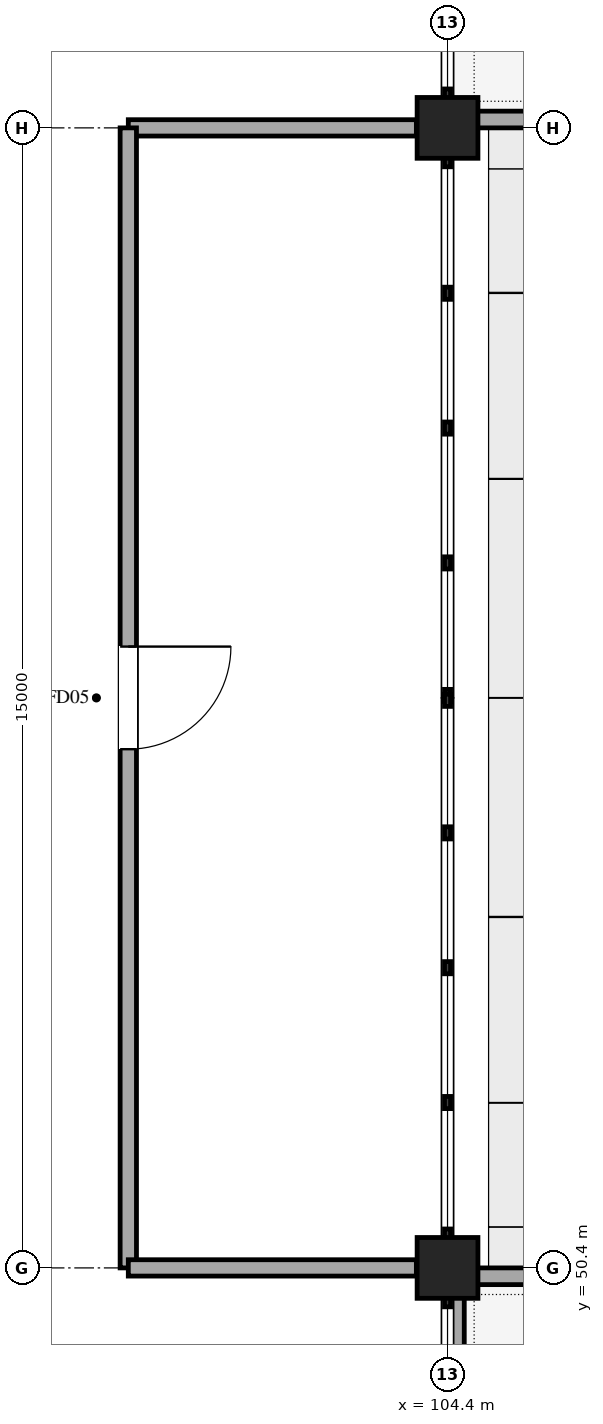
"""IFC4 building model, lengths in metres.
Left out: names, types, materials, properties, quantities, classifications, styles, units other than length and angle.
Written with IfcOpenShell. Run it as: python <this file> out.ifc"""

import sys

from ifc_helpers import new_model, si_unit, direction, frame, frame_2d, origin, origin_2d, place, context, subcontext, project, spatial, rectangle, extrude, element, fill, save


model = new_model("IFC4")
c1 = context("Model", 3, precision=1e-05, world=origin(), true_north=direction((0.0, 1.0)))
c2 = subcontext(c1, "Body", "Model", "MODEL_VIEW")
j1 = project(units=[si_unit("LENGTHUNIT", "METRE"), si_unit("PLANEANGLEUNIT", "RADIAN")], contexts=[c1])
p1 = place(None, origin())
s1 = spatial("IfcSite", under=j1, at=p1, CompositionType="ELEMENT")
p2 = place(p1, origin())
s2 = spatial("IfcBuilding", under=s1, at=p2, CompositionType="ELEMENT")
p3 = place(p2, frame((0.0, 0.0, 16.5)))
s3 = spatial("IfcBuildingStorey", under=s2, at=p3, CompositionType="ELEMENT", Elevation=16.5)
for number, where, z_axis, x_axis in (
    (1, (104.4, 50.4, 0.0), (0.0, 0.0, 1.0), (1.0, 0.0, 0.0)),
    (2, (104.4, 65.4, 0.0), (0.0, 0.0, 1.0), (1.0, 0.0, 0.0)),
):
    element("IfcColumn", number, at=place(p3, frame(where, z_axis=z_axis, x_axis=x_axis)), inside=s3, PredefinedType="COLUMN", context=c2, shape_type="SweptSolid", body=[
        extrude(rectangle(XDim=0.8, YDim=0.8, at=origin_2d()), origin(), (0.0, 0.0, 1.0), 5.1),
    ])
p4 = place(p3, frame((104.51, 0.11, 0.0), z_axis=(0.0, 0.0, 1.0), x_axis=(0.0, 1.0, 0.0)))
e3 = element("IfcWall", 3, at=p4, inside=s3, PredefinedType="PARAPET", context=c2, shape_type="SweptSolid", body=[
    extrude(rectangle(XDim=50.18, YDim=0.22, at=frame_2d((25.09, 0.0))), origin(), (0.0, 0.0, 1.0), 1.15),
])
for number, where, z_axis, x_axis in (
    (4, (104.51, 50.29, 0.0), (0.0, 0.0, 1.0), (1.0, 0.0, 0.0)),
    (5, (130.39, 65.51, 0.0), (0.0, 0.0, 1.0), (-1.0, 0.0, 0.0)),
):
    element("IfcWall", number, at=place(p3, frame(where, z_axis=z_axis, x_axis=x_axis)), inside=s3, PredefinedType="PARAPET", context=c2, shape_type="SweptSolid", body=[
        extrude(rectangle(XDim=25.88, YDim=0.22, at=frame_2d((12.94, 0.0))), origin(), (0.0, 0.0, 1.0), 1.15),
    ])
p5 = place(p3, frame((103.99, 65.4, 0.0), z_axis=(0.0, 0.0, 1.0), x_axis=(-1.0, 0.0, 0.0)))
e6 = element("IfcWall", 6, at=p5, inside=s3, PredefinedType="PARTITIONING", context=c2, shape_type="SweptSolid", body=[
    extrude(rectangle(XDim=3.79, YDim=0.215, at=frame_2d((1.895, 0.0))), origin(), (0.0, 0.0, 1.0), 4.06),
])
p6 = place(p3, frame((100.2, 65.4, 0.0), z_axis=(0.0, 0.0, 1.0), x_axis=(0.0, -1.0, 0.0)))
e7 = element("IfcWall", 7, at=p6, inside=s3, PredefinedType="PARTITIONING", context=c2, shape_type="SweptSolid", body=[
    extrude(rectangle(XDim=15.0, YDim=0.215, at=frame_2d((7.5, 0.0))), origin(), (0.0, 0.0, 1.0), 4.06),
])
p7 = place(p6, frame((6.825, 0.0, 0.0)))
e8 = element("IfcOpeningElement", 8, at=p7, cuts=e7, PredefinedType="OPENING", context=c2, shape_type="SweptSolid", body=[
    extrude(rectangle(XDim=1.35, YDim=2.2, at=frame_2d((0.675, 1.1))), frame((0.0, 0.118, 0.0), z_axis=(0.0, -1.0, 0.0), x_axis=(1.0, 0.0, 0.0)), (0.0, 0.0, 1.0), 0.235),
])
p8 = place(p3, frame((100.2, 50.4, 0.0), z_axis=(0.0, 0.0, 1.0), x_axis=(1.0, 0.0, 0.0)))
e9 = element("IfcWall", 9, at=p8, inside=s3, PredefinedType="PARTITIONING", context=c2, shape_type="SweptSolid", body=[
    extrude(rectangle(XDim=3.79, YDim=0.215, at=frame_2d((1.895, 0.0))), origin(), (0.0, 0.0, 1.0), 4.06),
])
p9 = place(p7, origin())
e10 = element("IfcDoor", 10, at=p9, inside=s3, OperationType="SINGLE_SWING_LEFT", PredefinedType="DOOR", context=c2, shape_type="SweptSolid", body=[
    extrude(rectangle(XDim=1.35, YDim=2.2, at=frame_2d((0.675, 1.1))), frame((0.0, 0.025, 0.0), z_axis=(0.0, -1.0, 0.0), x_axis=(1.0, 0.0, 0.0)), (0.0, 0.0, 1.0), 0.05),
])
fill(e8, e10)
save(model, sys.argv[1])
